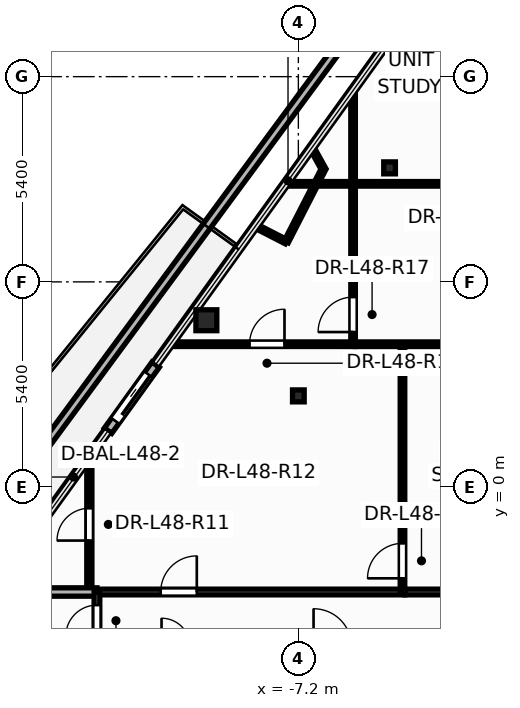
"""IFC4 building model, lengths in metres.
Left out: names, types, materials, properties, quantities, classifications, styles, units other than length and angle.
Written with IfcOpenShell. Run it as: python <this file> out.ifc"""

import sys

from ifc_helpers import new_model, si_unit, direction, frame, frame_2d, origin, origin_2d, place, context, subcontext, project, spatial, rectangle, hollow_circle, i_section, extrude, element, fill, save


model = new_model("IFC4")
c1 = context("Model", 3, precision=1e-05, world=origin(), true_north=direction((0.0, 1.0)))
c2 = subcontext(c1, "Body", "Model", "MODEL_VIEW")
j1 = project(units=[si_unit("LENGTHUNIT", "METRE"), si_unit("PLANEANGLEUNIT", "RADIAN")], contexts=[c1])
p1 = place(None, origin())
s1 = spatial("IfcSite", under=j1, at=p1, CompositionType="ELEMENT")
p2 = place(p1, origin())
s2 = spatial("IfcBuilding", under=s1, at=p2, CompositionType="ELEMENT")
p3 = place(p2, frame((0.0, 0.0, 185.7)))
s3 = spatial("IfcBuildingStorey", under=s2, at=p3, CompositionType="ELEMENT", Elevation=185.7)
p4 = place(p3, frame((-9.621, 4.391, 0.0), z_axis=(0.0, 0.0, 1.0), x_axis=(1.0, 0.0, 0.0)))
e1 = element("IfcColumn", 1, at=p4, inside=s3, PredefinedType="COLUMN", context=c2, shape_type="SweptSolid", body=[
    extrude(hollow_circle(Radius=0.275, WallThickness=0.024, at=origin_2d()), origin(), (0.0, 0.0, 1.0), 3.6),
])
for number, where, z_axis, x_axis in (
    (2, (-7.2, 2.4, 0.0), (0.0, 0.0, 1.0), (1.0, 0.0, 0.0)),
    (3, (-4.8, 8.4, 0.0), (0.0, 0.0, 1.0), (1.0, 0.0, 0.0)),
):
    element("IfcColumn", number, at=place(p3, frame(where, z_axis=z_axis, x_axis=x_axis)), inside=s3, PredefinedType="COLUMN", context=c2, shape_type="SweptSolid", body=[
        extrude(i_section(OverallWidth=0.307, OverallDepth=0.314, WebThickness=0.012, FlangeThickness=0.019, at=origin_2d()), origin(), (0.0, 0.0, 1.0), 3.6),
    ])
p5 = place(p3, frame((-4.306, 14.064, -0.02), z_axis=(0.0, 0.0, 1.0), x_axis=(-0.593493783315, -0.804838573359, 0.0)))
e4 = element("IfcWall", 4, at=p5, inside=s3, PredefinedType="PARAPET", context=c2, shape_type="SweptSolid", body=[
    extrude(rectangle(XDim=31.104, YDim=0.22, at=frame_2d((15.552, 0.0))), origin(), (0.0, 0.0, 1.0), 1.17),
])
p6 = place(p3, frame((-10.956, 3.221, -0.015), z_axis=(0.0, 0.0, 1.0), x_axis=(-0.584352812003, -0.811499717255, 0.0)))
e5 = element("IfcWall", 5, at=p6, inside=s3, PredefinedType="STANDARD", context=c2, shape_type="SweptSolid", body=[
    extrude(rectangle(XDim=2.14, YDim=0.24, at=frame_2d((1.07, 0.0))), origin(), (0.0, 0.0, 1.0), 2.807),
])
p7 = place(p6, frame((0.32, 0.0, 0.015)))
e6 = element("IfcOpeningElement", 6, at=p7, cuts=e5, PredefinedType="OPENING", context=c2, shape_type="SweptSolid", body=[
    extrude(rectangle(XDim=1.506, YDim=2.204, at=frame_2d((0.75, 1.102))), frame((0.0, 0.13, 0.0), z_axis=(0.0, -1.0, 0.0), x_axis=(1.0, 0.0, 0.0)), (0.0, 0.0, 1.0), 0.26),
])
p8 = place(p3, frame((-12.5, -2.76, 0.0), z_axis=(0.0, 0.0, 1.0), x_axis=(1.0, 0.0, 0.0)))
e7 = element("IfcWall", 7, at=p8, inside=s3, PredefinedType="PARTITIONING", context=c2, shape_type="SweptSolid", body=[
    extrude(rectangle(XDim=8.1, YDim=0.15, at=frame_2d((4.05, 0.0))), origin(), (0.0, 0.0, 1.0), 2.325),
])
p9 = place(p8, frame((1.678, 0.0, 0.0)))
e8 = element("IfcOpeningElement", 8, at=p9, cuts=e7, PredefinedType="OPENING", context=c2, shape_type="SweptSolid", body=[
    extrude(rectangle(XDim=0.956, YDim=2.104, at=frame_2d((0.475, 1.052))), frame((0.0, 0.085, 0.0), z_axis=(0.0, -1.0, 0.0), x_axis=(1.0, 0.0, 0.0)), (0.0, 0.0, 1.0), 0.17),
])
p10 = place(p3, frame((-5.76, 3.76, 0.0), z_axis=(0.0, 0.0, 1.0), x_axis=(0.0, 1.0, 0.0)))
e9 = element("IfcWall", 9, at=p10, inside=s3, PredefinedType="PARTITIONING", context=c2, shape_type="SweptSolid", body=[
    extrude(rectangle(XDim=6.676, YDim=0.12, at=frame_2d((3.338, 0.0))), origin(), (0.0, 0.0, 1.0), 2.325),
])
p11 = place(p10, frame((0.32, 0.0, 0.0)))
e10 = element("IfcOpeningElement", 10, at=p11, cuts=e9, PredefinedType="OPENING", context=c2, shape_type="SweptSolid", body=[
    extrude(rectangle(XDim=0.926, YDim=2.104, at=frame_2d((0.46, 1.052))), frame((0.0, 0.07, 0.0), z_axis=(0.0, -1.0, 0.0), x_axis=(1.0, 0.0, 0.0)), (0.0, 0.0, 1.0), 0.14),
])
p12 = place(p3, frame((-7.529, 7.98, 0.0), z_axis=(0.0, 0.0, 1.0), x_axis=(1.0, 0.0, 0.0)))
e11 = element("IfcWall", 11, at=p12, inside=s3, PredefinedType="PARTITIONING", context=c2, shape_type="SweptSolid", body=[
    extrude(rectangle(XDim=6.609, YDim=0.12, at=frame_2d((3.304, 0.0))), origin(), (0.0, 0.0, 1.0), 2.325),
])
p13 = place(p12, frame((4.648, 0.0, 0.0)))
e12 = element("IfcOpeningElement", 12, at=p13, cuts=e11, PredefinedType="OPENING", context=c2, shape_type="SweptSolid", body=[
    extrude(rectangle(XDim=0.926, YDim=2.104, at=frame_2d((0.46, 1.052))), frame((0.0, 0.07, 0.0), z_axis=(0.0, -1.0, 0.0), x_axis=(1.0, 0.0, 0.0)), (0.0, 0.0, 1.0), 0.14),
])
p14 = place(p3, frame((-4.46, -2.76, 0.0), z_axis=(0.0, 0.0, 1.0), x_axis=(0.0, 1.0, 0.0)))
e13 = element("IfcWall", 13, at=p14, inside=s3, PredefinedType="PARTITIONING", context=c2, shape_type="SweptSolid", body=[
    extrude(rectangle(XDim=6.52, YDim=0.12, at=frame_2d((3.26, 0.0))), origin(), (0.0, 0.0, 1.0), 2.325),
])
p15 = place(p14, frame((0.36, 0.0, 0.0)))
e14 = element("IfcOpeningElement", 14, at=p15, cuts=e13, PredefinedType="OPENING", context=c2, shape_type="SweptSolid", body=[
    extrude(rectangle(XDim=0.926, YDim=2.104, at=frame_2d((0.46, 1.052))), frame((0.0, 0.07, 0.0), z_axis=(0.0, -1.0, 0.0), x_axis=(1.0, 0.0, 0.0)), (0.0, 0.0, 1.0), 0.14),
])
p16 = place(p3, frame((-4.398, -2.76, 0.0), z_axis=(0.0, 0.0, 1.0), x_axis=(1.0, 0.0, 0.0)))
e15 = element("IfcWall", 15, at=p16, inside=s3, PredefinedType="PARTITIONING", context=c2, shape_type="SweptSolid", body=[
    extrude(rectangle(XDim=16.898, YDim=0.15, at=frame_2d((8.449, 0.0))), origin(), (0.0, 0.0, 1.0), 2.325),
])
p17 = place(p3, frame((-10.568, 3.76, 0.0), z_axis=(0.0, 0.0, 1.0), x_axis=(1.0, 0.0, 0.0)))
e16 = element("IfcWall", 16, at=p17, inside=s3, PredefinedType="PARTITIONING", context=c2, shape_type="SweptSolid", body=[
    extrude(rectangle(XDim=4.868, YDim=0.12, at=frame_2d((2.434, 0.0))), origin(), (0.0, 0.0, 1.0), 2.325),
])
p18 = place(p17, frame((2.083, 0.0, 0.0)))
e17 = element("IfcOpeningElement", 17, at=p18, cuts=e16, PredefinedType="OPENING", context=c2, shape_type="SweptSolid", body=[
    extrude(rectangle(XDim=0.926, YDim=2.104, at=frame_2d((0.46, 1.052))), frame((0.0, 0.07, 0.0), z_axis=(0.0, -1.0, 0.0), x_axis=(1.0, 0.0, 0.0)), (0.0, 0.0, 1.0), 0.14),
])
p19 = place(p3, frame((-5.698, 3.76, 0.0), z_axis=(0.0, 0.0, 1.0), x_axis=(1.0, 0.0, 0.0)))
e18 = element("IfcWall", 18, at=p19, inside=s3, PredefinedType="PARTITIONING", context=c2, shape_type="SweptSolid", body=[
    extrude(rectangle(XDim=4.716, YDim=0.12, at=frame_2d((2.358, 0.0))), origin(), (0.0, 0.0, 1.0), 2.969),
])
p20 = place(p3, frame((-12.7, -2.76, 0.0), z_axis=(0.0, 0.0, 1.0), x_axis=(0.0, 1.0, 0.0)))
e19 = element("IfcWall", 19, at=p20, inside=s3, PredefinedType="PARTITIONING", context=c2, shape_type="SweptSolid", body=[
    extrude(rectangle(XDim=3.559, YDim=0.135, at=frame_2d((1.78, 0.0))), origin(), (0.0, 0.0, 1.0), 2.325),
])
p21 = place(p20, frame((1.353, 0.0, 0.0)))
e20 = element("IfcOpeningElement", 20, at=p21, cuts=e19, PredefinedType="OPENING", context=c2, shape_type="SweptSolid", body=[
    extrude(rectangle(XDim=0.856, YDim=2.104, at=frame_2d((0.425, 1.052))), frame((0.0, 0.078, 0.0), z_axis=(0.0, -1.0, 0.0), x_axis=(1.0, 0.0, 0.0)), (0.0, 0.0, 1.0), 0.155),
])
p22 = place(p3, frame((-15.263, -2.76, 0.0), z_axis=(0.0, 0.0, 1.0), x_axis=(1.0, 0.0, 0.0)))
e21 = element("IfcWall", 21, at=p22, inside=s3, PredefinedType="PARTITIONING", context=c2, shape_type="SweptSolid", body=[
    extrude(rectangle(XDim=2.763, YDim=0.22, at=frame_2d((1.382, 0.0))), origin(), (0.0, 0.0, 1.0), 2.325),
])
p23 = place(p3, frame((-6.537, 8.37, 0.0), z_axis=(0.0, 0.0, 1.0), x_axis=(-0.456180683214, -0.889887175018, 0.0)))
e22 = element("IfcWall", 22, at=p23, inside=s3, PredefinedType="PARTITIONING", context=c2, shape_type="SweptSolid", body=[
    extrude(rectangle(XDim=2.151, YDim=0.12, at=frame_2d((1.075, 0.0))), origin(), (0.0, 0.0, 1.0), 3.35),
])
p24 = place(p3, frame((-12.5, -4.24, 0.0), z_axis=(0.0, 0.0, 1.0), x_axis=(0.0, 1.0, 0.0)))
e23 = element("IfcWall", 23, at=p24, inside=s3, PredefinedType="PARTITIONING", context=c2, shape_type="SweptSolid", body=[
    extrude(rectangle(XDim=1.48, YDim=0.15, at=frame_2d((0.74, 0.0))), origin(), (0.0, 0.0, 1.0), 2.325),
])
p25 = place(p24, frame((0.315, 0.0, 0.0)))
e24 = element("IfcOpeningElement", 24, at=p25, cuts=e23, PredefinedType="OPENING", context=c2, shape_type="SweptSolid", body=[
    extrude(rectangle(XDim=0.826, YDim=2.104, at=frame_2d((0.41, 1.052))), frame((0.0, 0.085, 0.0), z_axis=(0.0, -1.0, 0.0), x_axis=(1.0, 0.0, 0.0)), (0.0, 0.0, 1.0), 0.17),
])
p26 = place(p3, frame((-7.518, 6.456, 0.0), z_axis=(0.0, 0.0, 1.0), x_axis=(-0.889930495704, 0.456096166194, 0.0)))
e25 = element("IfcWall", 25, at=p26, inside=s3, PredefinedType="PARTITIONING", context=c2, shape_type="SweptSolid", body=[
    extrude(rectangle(XDim=0.899, YDim=0.12, at=frame_2d((0.45, 0.0))), origin(), (0.0, 0.0, 1.0), 2.792),
])
p27 = place(p3, frame((-6.841, 8.917, 0.0), z_axis=(0.0, 0.0, 1.0), x_axis=(0.485146567495, -0.874432849365, 0.0)))
e26 = element("IfcWall", 26, at=p27, inside=s3, PredefinedType="PARTITIONING", context=c2, shape_type="SweptSolid", body=[
    extrude(rectangle(XDim=0.626, YDim=0.12, at=frame_2d((0.313, 0.0))), origin(), (0.0, 0.0, 1.0), 2.792),
])
p28 = place(p7, origin())
e27 = element("IfcDoor", 27, at=p28, inside=s3, OperationType="SLIDING_TO_RIGHT", PredefinedType="DOOR", context=c2, shape_type="SweptSolid", body=[
    extrude(rectangle(XDim=1.5, YDim=2.2, at=frame_2d((0.75, 1.1))), frame((0.0, 0.025, 0.0), z_axis=(0.0, -1.0, 0.0), x_axis=(1.0, 0.0, 0.0)), (0.0, 0.0, 1.0), 0.05),
])
fill(e6, e27)
p29 = place(p25, origin())
e28 = element("IfcDoor", 28, at=p29, inside=s3, OperationType="SINGLE_SWING_LEFT", PredefinedType="DOOR", context=c2, shape_type="SweptSolid", body=[
    extrude(rectangle(XDim=0.82, YDim=2.1, at=frame_2d((0.41, 1.05))), frame((0.0, 0.025, 0.0), z_axis=(0.0, -1.0, 0.0), x_axis=(1.0, 0.0, 0.0)), (0.0, 0.0, 1.0), 0.05),
])
fill(e24, e28)
p30 = place(p21, origin())
e29 = element("IfcDoor", 29, at=p30, inside=s3, OperationType="SINGLE_SWING_LEFT", PredefinedType="DOOR", context=c2, shape_type="SweptSolid", body=[
    extrude(rectangle(XDim=0.85, YDim=2.1, at=frame_2d((0.425, 1.05))), frame((0.0, 0.025, 0.0), z_axis=(0.0, -1.0, 0.0), x_axis=(1.0, 0.0, 0.0)), (0.0, 0.0, 1.0), 0.05),
])
fill(e20, e29)
p31 = place(p9, origin())
e30 = element("IfcDoor", 30, at=p31, inside=s3, OperationType="SINGLE_SWING_RIGHT", PredefinedType="DOOR", context=c2, shape_type="SweptSolid", body=[
    extrude(rectangle(XDim=0.95, YDim=2.1, at=frame_2d((0.475, 1.05))), frame((0.0, 0.025, 0.0), z_axis=(0.0, -1.0, 0.0), x_axis=(1.0, 0.0, 0.0)), (0.0, 0.0, 1.0), 0.05),
])
fill(e8, e30)
p32 = place(p15, origin())
e31 = element("IfcDoor", 31, at=p32, inside=s3, OperationType="SINGLE_SWING_LEFT", PredefinedType="DOOR", context=c2, shape_type="SweptSolid", body=[
    extrude(rectangle(XDim=0.92, YDim=2.1, at=frame_2d((0.46, 1.05))), frame((0.0, 0.025, 0.0), z_axis=(0.0, -1.0, 0.0), x_axis=(1.0, 0.0, 0.0)), (0.0, 0.0, 1.0), 0.05),
])
fill(e14, e31)
p33 = place(p18, origin())
e32 = element("IfcDoor", 32, at=p33, inside=s3, OperationType="SINGLE_SWING_RIGHT", PredefinedType="DOOR", context=c2, shape_type="SweptSolid", body=[
    extrude(rectangle(XDim=0.92, YDim=2.1, at=frame_2d((0.46, 1.05))), frame((0.0, 0.025, 0.0), z_axis=(0.0, -1.0, 0.0), x_axis=(1.0, 0.0, 0.0)), (0.0, 0.0, 1.0), 0.05),
])
fill(e17, e32)
p34 = place(p11, origin())
e33 = element("IfcDoor", 33, at=p34, inside=s3, OperationType="SINGLE_SWING_LEFT", PredefinedType="DOOR", context=c2, shape_type="SweptSolid", body=[
    extrude(rectangle(XDim=0.92, YDim=2.1, at=frame_2d((0.46, 1.05))), frame((0.0, 0.025, 0.0), z_axis=(0.0, -1.0, 0.0), x_axis=(1.0, 0.0, 0.0)), (0.0, 0.0, 1.0), 0.05),
])
fill(e10, e33)
save(model, sys.argv[1])
